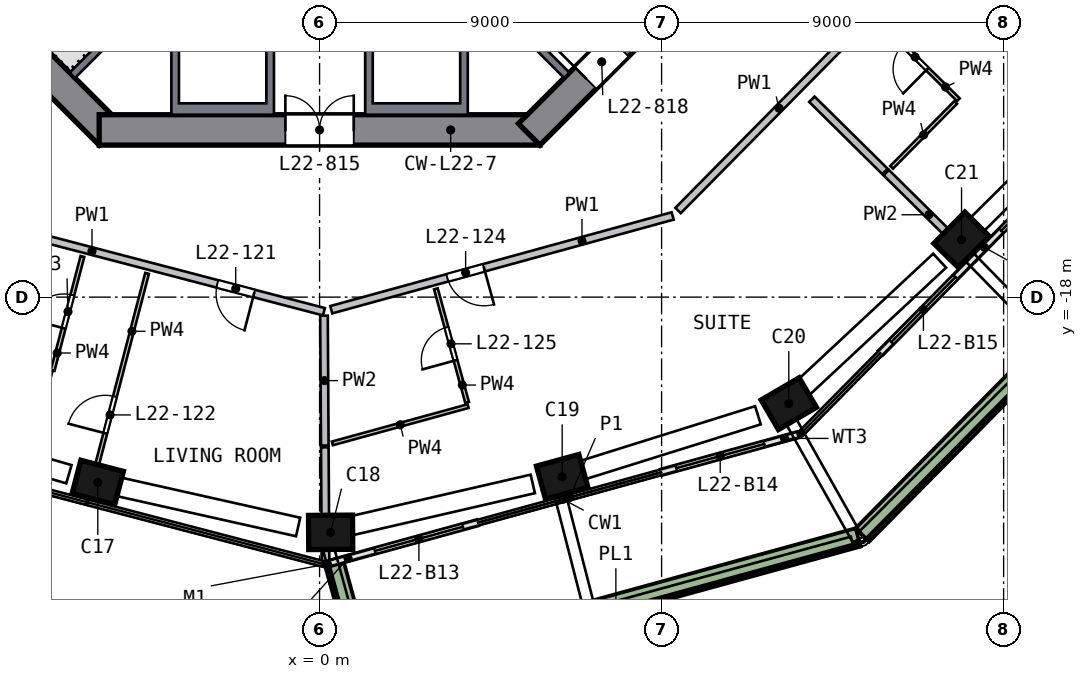
"""IFC4 building model, lengths in metres.
Left out: names, types, materials, properties, quantities, classifications, styles, units other than length and angle.
Written with IfcOpenShell. Run it as: python <this file> out.ifc"""

import sys

from ifc_helpers import new_model, si_unit, direction, frame, frame_2d, origin, origin_2d, place, context, subcontext, project, spatial, polyline, rectangle, outline, extrude, element, fill, save


model = new_model("IFC4")
c1 = context("Model", 3, precision=1e-05, world=origin(), true_north=direction((0.0, 1.0)))
c2 = subcontext(c1, "Body", "Model", "MODEL_VIEW")
j1 = project(units=[si_unit("LENGTHUNIT", "METRE"), si_unit("PLANEANGLEUNIT", "RADIAN")], contexts=[c1])
p1 = place(None, origin())
s1 = spatial("IfcSite", under=j1, at=p1, CompositionType="ELEMENT")
p2 = place(p1, origin())
s2 = spatial("IfcBuilding", under=s1, at=p2, CompositionType="ELEMENT")
p3 = place(p2, frame((0.0, 0.0, 96.5)))
s3 = spatial("IfcBuildingStorey", under=s2, at=p3, CompositionType="ELEMENT", Elevation=96.5)
p4 = place(p3, frame((-5.967, -22.842, 0.0), z_axis=(0.108904014, -0.027454154, 0.993673078), x_axis=(0.961432329, -0.251067637, -0.112307249)))
e1 = element("IfcColumn", 1, at=p4, inside=s3, PredefinedType="COLUMN", context=c2, shape_type="SweptSolid", body=[
    extrude(rectangle(XDim=1.15, YDim=0.9, at=origin_2d()), origin(), (0.0, 0.0, 1.0), 3.21),
])
p5 = place(p3, frame((0.152, -24.192, 0.0), z_axis=(0.115027932, 0.001672581, 0.993360849), x_axis=(-0.993343145, -0.00600963, 0.115036001)))
e2 = element("IfcColumn", 2, at=p5, inside=s3, PredefinedType="COLUMN", context=c2, shape_type="SweptSolid", body=[
    extrude(rectangle(XDim=1.15, YDim=0.9, at=origin_2d()), origin(), (0.0, 0.0, 1.0), 3.211),
])
p6 = place(p3, frame((6.253, -22.765, 0.0), z_axis=(0.108066988, 0.030724182, 0.993668733), x_axis=(0.958062623, 0.263618015, -0.112345681)))
e3 = element("IfcColumn", 3, at=p6, inside=s3, PredefinedType="COLUMN", context=c2, shape_type="SweptSolid", body=[
    extrude(rectangle(XDim=1.15, YDim=0.9, at=origin_2d()), origin(), (0.0, 0.0, 1.0), 3.21),
])
p7 = place(p3, frame((12.228, -20.875, 0.0), z_axis=(0.098758749, 0.058920732, 0.99336552), x_axis=(-0.857366586, -0.501695659, 0.114995663)))
e4 = element("IfcColumn", 4, at=p7, inside=s3, PredefinedType="COLUMN", context=c2, shape_type="SweptSolid", body=[
    extrude(rectangle(XDim=1.15, YDim=0.9, at=origin_2d()), origin(), (0.0, 0.0, 1.0), 3.211),
])
p8 = place(p3, frame((16.798, -16.588, 0.0), z_axis=(0.078255888, 0.080537401, 0.993674868), x_axis=(0.698489901, 0.706754906, -0.112291409)))
e5 = element("IfcColumn", 5, at=p8, inside=s3, PredefinedType="COLUMN", context=c2, shape_type="SweptSolid", body=[
    extrude(rectangle(XDim=1.15, YDim=0.9, at=origin_2d()), origin(), (0.0, 0.0, 1.0), 3.21),
])
p9 = place(p3, frame((-13.717, -5.516, 0.0), z_axis=(0.0, 0.0, 1.0), x_axis=(0.707106781, -0.707106781, 0.0)))
e6 = element("IfcWall", 6, at=p9, inside=s3, PredefinedType="SHEAR", context=c2, shape_type="SweptSolid", body=[
    extrude(rectangle(XDim=11.598, YDim=0.8, at=frame_2d((5.799, 0.0))), origin(), (0.0, 0.0, 1.0), 3.5),
])
p10 = place(p9, frame((2.099, 0.0, 0.0)))
e7 = element("IfcOpeningElement", 7, at=p10, cuts=e6, PredefinedType="OPENING", context=c2, shape_type="SweptSolid", body=[
    extrude(rectangle(XDim=1.2, YDim=2.1, at=frame_2d((0.6, 1.05))), frame((0.0, 0.41, 0.0), z_axis=(0.0, -1.0, 0.0), x_axis=(1.0, 0.0, 0.0)), (0.0, 0.0, 1.0), 0.82),
])
p11 = place(p3, frame((-5.799, -13.6, 0.0), z_axis=(0.0, 0.0, 1.0), x_axis=(1.0, 0.0, 0.0)))
e8 = element("IfcWall", 8, at=p11, inside=s3, PredefinedType="SHEAR", context=c2, shape_type="SweptSolid", body=[
    extrude(rectangle(XDim=11.598, YDim=0.8, at=frame_2d((5.799, 0.0))), origin(), (0.0, 0.0, 1.0), 3.5),
])
p12 = place(p11, frame((4.899, 0.0, 0.0)))
e9 = element("IfcOpeningElement", 9, at=p12, cuts=e8, PredefinedType="OPENING", context=c2, shape_type="SweptSolid", body=[
    extrude(rectangle(XDim=1.8, YDim=2.1, at=frame_2d((0.9, 1.05))), frame((0.0, 0.41, 0.0), z_axis=(0.0, -1.0, 0.0), x_axis=(1.0, 0.0, 0.0)), (0.0, 0.0, 1.0), 0.82),
])
p13 = place(p3, frame((5.516, -13.717, 0.0), z_axis=(0.0, 0.0, 1.0), x_axis=(0.707106781, 0.707106781, 0.0)))
e10 = element("IfcWall", 10, at=p13, inside=s3, PredefinedType="SHEAR", context=c2, shape_type="SweptSolid", body=[
    extrude(rectangle(XDim=11.598, YDim=0.8, at=frame_2d((5.799, 0.0))), origin(), (0.0, 0.0, 1.0), 3.5),
])
p14 = place(p13, frame((2.099, 0.0, 0.0)))
e11 = element("IfcOpeningElement", 11, at=p14, cuts=e10, PredefinedType="OPENING", context=c2, shape_type="SweptSolid", body=[
    extrude(rectangle(XDim=1.2, YDim=2.1, at=frame_2d((0.6, 1.05))), frame((0.0, 0.41, 0.0), z_axis=(0.0, -1.0, 0.0), x_axis=(1.0, 0.0, 0.0)), (0.0, 0.0, 1.0), 0.82),
])
p15 = place(p3, frame((0.235, -25.015, 0.0), z_axis=(0.0, 0.0, 1.0), x_axis=(0.964284377, 0.2648691, 0.0)))
e12 = element("IfcWall", 12, at=p15, inside=s3, PredefinedType="SOLIDWALL", context=c2, shape_type="SweptSolid", body=[
    extrude(rectangle(XDim=4.068, YDim=0.15, at=frame_2d((2.034, 0.0))), origin(), (0.0, 0.0, 1.0), 2.425),
])
p16 = place(p15, frame((1.268, 0.0, 0.0)))
e13 = element("IfcOpeningElement", 13, at=p16, cuts=e12, PredefinedType="OPENING", context=c2, shape_type="SweptSolid", body=[
    extrude(rectangle(XDim=2.4, YDim=2.4, at=frame_2d((1.2, 1.2))), frame((0.0, 0.085, 0.0), z_axis=(0.0, -1.0, 0.0), x_axis=(1.0, 0.0, 0.0)), (0.0, 0.0, 1.0), 0.17),
])
p17 = place(p3, frame((8.999, -22.607, 0.0), z_axis=(0.0, 0.0, 1.0), x_axis=(0.964270134, 0.264920947, 0.0)))
e14 = element("IfcWall", 14, at=p17, inside=s3, PredefinedType="SOLIDWALL", context=c2, shape_type="SweptSolid", body=[
    extrude(rectangle(XDim=3.71, YDim=0.15, at=frame_2d((1.855, 0.0))), origin(), (0.0, 0.0, 1.0), 2.425),
])
p18 = place(p17, frame((0.4, 0.0, 0.0)))
e15 = element("IfcOpeningElement", 15, at=p18, cuts=e14, PredefinedType="OPENING", context=c2, shape_type="SweptSolid", body=[
    extrude(rectangle(XDim=2.4, YDim=2.4, at=frame_2d((1.2, 1.2))), frame((0.0, 0.085, 0.0), z_axis=(0.0, -1.0, 0.0), x_axis=(1.0, 0.0, 0.0)), (0.0, 0.0, 1.0), 0.17),
])
p19 = place(p3, frame((14.766, -19.465, 0.0), z_axis=(0.0, 0.0, 1.0), x_axis=(0.702631444, 0.711553971, 0.0)))
e16 = element("IfcWall", 16, at=p19, inside=s3, PredefinedType="SOLIDWALL", context=c2, shape_type="SweptSolid", body=[
    extrude(rectangle(XDim=3.475, YDim=0.15, at=frame_2d((1.738, 0.0))), origin(), (0.0, 0.0, 1.0), 2.425),
])
p20 = place(p19, frame((0.4, 0.0, 0.0)))
e17 = element("IfcOpeningElement", 17, at=p20, cuts=e16, PredefinedType="OPENING", context=c2, shape_type="SweptSolid", body=[
    extrude(rectangle(XDim=2.4, YDim=2.4, at=frame_2d((1.2, 1.2))), frame((0.0, 0.085, 0.0), z_axis=(0.0, -1.0, 0.0), x_axis=(1.0, 0.0, 0.0)), (0.0, 0.0, 1.0), 0.17),
])
p21 = place(p3, frame((17.207, -16.992, 0.0), z_axis=(0.0, 0.0, 1.0), x_axis=(0.702669036, 0.711516848, 0.0)))
e18 = element("IfcWall", 18, at=p21, inside=s3, PredefinedType="SOLIDWALL", context=c2, shape_type="SweptSolid", body=[
    extrude(rectangle(XDim=3.835, YDim=0.15, at=frame_2d((1.918, 0.0))), origin(), (0.0, 0.0, 1.0), 2.425),
])
p22 = place(p21, frame((1.035, 0.0, 0.0)))
e19 = element("IfcOpeningElement", 19, at=p22, cuts=e18, PredefinedType="OPENING", context=c2, shape_type="SweptSolid", body=[
    extrude(rectangle(XDim=2.4, YDim=2.4, at=frame_2d((1.2, 1.2))), frame((0.0, 0.085, 0.0), z_axis=(0.0, -1.0, 0.0), x_axis=(1.0, 0.0, 0.0)), (0.0, 0.0, 1.0), 0.17),
])
p23 = place(p3, frame((0.399, -25.048, 0.0), z_axis=(0.0, 0.0, 1.0), x_axis=(0.264899272, -0.964276089, 0.0)))
e20 = element("IfcWall", 20, at=p23, inside=s3, PredefinedType="SOLIDWALL", context=c2, shape_type="SweptSolid", body=[
    extrude(rectangle(XDim=3.199, YDim=0.5, at=frame_2d((1.6, 0.0))), origin(), (0.0, 0.0, 1.0), 0.7),
])
p24 = place(p3, frame((1.421, -27.826, 0.0), z_axis=(0.0, 0.0, 1.0), x_axis=(0.964279464, 0.264886985, 0.0)))
e21 = element("IfcWall", 21, at=p24, inside=s3, PredefinedType="SOLIDWALL", context=c2, shape_type="SweptSolid", body=[
    extrude(rectangle(XDim=13.223, YDim=0.5, at=frame_2d((6.612, 0.0))), origin(), (0.0, 0.0, 1.0), 0.7),
])
p25 = place(p3, frame((14.284, -24.258, 0.0), z_axis=(0.0, 0.0, 1.0), x_axis=(0.702654229, 0.711531471, 0.0)))
e22 = element("IfcWall", 22, at=p25, inside=s3, PredefinedType="SOLIDWALL", context=c2, shape_type="SweptSolid", body=[
    extrude(rectangle(XDim=13.723, YDim=0.5, at=frame_2d((6.862, 0.0))), origin(), (0.0, 0.0, 1.0), 0.7),
])
p26 = place(p3, origin())
e23 = element("IfcWall", 23, at=p26, inside=s3, PredefinedType="SOLIDWALL", context=c2, shape_type="SweptSolid", body=[
    extrude(outline(polyline([(-1.2, -13.2), (-3.9, -13.2), (-3.9, -10.7), (-1.2, -10.7), (-1.2, -13.2)]), holes=[polyline([(-3.7, -10.9), (-3.7, -12.9), (-1.4, -12.9), (-1.4, -10.9), (-3.7, -10.9)])]), origin(), (0.0, 0.0, 1.0), 3.19),
])
p27 = place(p3, origin())
e24 = element("IfcWall", 24, at=p27, inside=s3, PredefinedType="SOLIDWALL", context=c2, shape_type="SweptSolid", body=[
    extrude(outline(polyline([(3.9, -10.7), (3.9, -13.2), (1.2, -13.2), (1.2, -10.7), (3.9, -10.7)]), holes=[polyline([(1.4, -12.9), (3.7, -12.9), (3.7, -10.9), (1.4, -10.9), (1.4, -12.9)])]), origin(), (0.0, 0.0, 1.0), 3.19),
])
for number, where, z_axis, x_axis in (
    (25, (-3.677, -9.334, 0.0), (0.0, 0.0, 1.0), (-0.707, -0.707, 0.0)),
    (26, (3.677, -9.334, 0.0), (0.0, 0.0, 1.0), (0.707, -0.707, 0.0)),
):
    element("IfcWall", number, at=place(p3, frame(where, z_axis=z_axis, x_axis=x_axis)), inside=s3, PredefinedType="SOLIDWALL", context=c2, shape_type="SweptSolid", body=[
        extrude(rectangle(XDim=4.0, YDim=0.2, at=frame_2d((2.0, 0.0))), origin(), (0.0, 0.0, 1.0), 3.19),
    ])
p28 = place(p3, frame((0.115, -18.385, 0.0), z_axis=(0.0, 0.0, 1.0), x_axis=(-0.967527583, 0.252765459, 0.0)))
e27 = element("IfcWall", 27, at=p28, inside=s3, PredefinedType="SOLIDWALL", context=c2, shape_type="SweptSolid", body=[
    extrude(rectangle(XDim=9.517, YDim=0.2, at=frame_2d((4.758, 0.0))), origin(), (0.0, 0.0, 1.0), 3.19),
])
p29 = place(p28, frame((1.9, 0.0, 0.0)))
e28 = element("IfcOpeningElement", 28, at=p29, cuts=e27, PredefinedType="OPENING", context=c2, shape_type="SweptSolid", body=[
    extrude(rectangle(XDim=1.0, YDim=2.1, at=frame_2d((0.5, 1.05))), frame((0.0, 0.11, 0.0), z_axis=(0.0, -1.0, 0.0), x_axis=(1.0, 0.0, 0.0)), (0.0, 0.0, 1.0), 0.22),
])
p30 = place(p3, frame((9.292, -15.864, 0.0), z_axis=(0.0, 0.0, 1.0), x_axis=(-0.96428508, -0.264866543, 0.0)))
e29 = element("IfcWall", 29, at=p30, inside=s3, PredefinedType="SOLIDWALL", context=c2, shape_type="SweptSolid", body=[
    extrude(rectangle(XDim=9.316, YDim=0.2, at=frame_2d((4.658, 0.0))), origin(), (0.0, 0.0, 1.0), 3.19),
])
p31 = place(p30, frame((5.15, 0.0, 0.0)))
e30 = element("IfcOpeningElement", 30, at=p31, cuts=e29, PredefinedType="OPENING", context=c2, shape_type="SweptSolid", body=[
    extrude(rectangle(XDim=1.0, YDim=2.1, at=frame_2d((0.5, 1.05))), frame((0.0, 0.11, 0.0), z_axis=(0.0, -1.0, 0.0), x_axis=(1.0, 0.0, 0.0)), (0.0, 0.0, 1.0), 0.22),
])
p32 = place(p3, frame((15.839, -9.235, 0.0), z_axis=(0.0, 0.0, 1.0), x_axis=(-0.702660587, -0.711525192, 0.0)))
e31 = element("IfcWall", 31, at=p32, inside=s3, PredefinedType="SOLIDWALL", context=c2, shape_type="SweptSolid", body=[
    extrude(rectangle(XDim=9.116, YDim=0.2, at=frame_2d((4.558, 0.0))), origin(), (0.0, 0.0, 1.0), 3.19),
])
p33 = place(p32, frame((0.35, 0.0, 0.0)))
e32 = element("IfcOpeningElement", 32, at=p33, cuts=e31, PredefinedType="OPENING", context=c2, shape_type="SweptSolid", body=[
    extrude(rectangle(XDim=1.0, YDim=2.1, at=frame_2d((0.5, 1.05))), frame((0.0, 0.11, 0.0), z_axis=(0.0, -1.0, 0.0), x_axis=(1.0, 0.0, 0.0)), (0.0, 0.0, 1.0), 0.22),
])
p34 = place(p3, frame((0.116, -18.488, 0.0), z_axis=(0.0, 0.0, 1.0), x_axis=(0.006284692, -0.999980251, 0.0)))
e33 = element("IfcWall", 33, at=p34, inside=s3, PredefinedType="SOLIDWALL", context=c2, shape_type="SweptSolid", body=[
    extrude(rectangle(XDim=3.418, YDim=0.2, at=frame_2d((1.709, 0.0))), origin(), (0.0, 0.0, 1.0), 3.19),
])
p35 = place(p3, frame((0.138, -21.952, 0.0), z_axis=(0.0, 0.0, 1.0), x_axis=(0.006323343, -0.999980007, 0.0)))
e34 = element("IfcWall", 34, at=p35, inside=s3, PredefinedType="SOLIDWALL", context=c2, shape_type="SweptSolid", body=[
    extrude(rectangle(XDim=3.011, YDim=0.2, at=frame_2d((1.506, 0.0))), origin(), (0.0, 0.0, 1.0), 3.19),
])
p36 = place(p3, frame((12.954, -12.792, 0.0), z_axis=(0.0, 0.0, 1.0), x_axis=(0.711560793, -0.702624535, 0.0)))
e35 = element("IfcWall", 35, at=p36, inside=s3, PredefinedType="SOLIDWALL", context=c2, shape_type="SweptSolid", body=[
    extrude(rectangle(XDim=2.705, YDim=0.2, at=frame_2d((1.352, 0.0))), origin(), (0.0, 0.0, 1.0), 3.19),
])
p37 = place(p3, frame((14.911, -14.725, 0.0), z_axis=(0.0, 0.0, 1.0), x_axis=(0.711546698, -0.702638809, 0.0)))
e36 = element("IfcWall", 36, at=p37, inside=s3, PredefinedType="SOLIDWALL", context=c2, shape_type="SweptSolid", body=[
    extrude(rectangle(XDim=3.152, YDim=0.2, at=frame_2d((1.576, 0.0))), origin(), (0.0, 0.0, 1.0), 3.19),
])
p38 = place(p3, frame((16.453, -9.362, 0.0), z_axis=(0.0, 0.0, 1.0), x_axis=(0.869145541, -0.494556396, 0.0)))
e37 = element("IfcWall", 37, at=p38, inside=s3, PredefinedType="SOLIDWALL", context=c2, shape_type="SweptSolid", body=[
    extrude(rectangle(XDim=6.034, YDim=0.2, at=frame_2d((3.017, 0.0))), origin(), (0.0, 0.0, 1.0), 3.19),
])
p39 = place(p3, frame((-10.633, -19.091, 0.0), z_axis=(0.0, 0.0, 1.0), x_axis=(0.967525515, -0.252773373, 0.0)))
e38 = element("IfcWall", 38, at=p39, inside=s3, PredefinedType="PARTITIONING", context=c2, shape_type="SweptSolid", body=[
    extrude(rectangle(XDim=3.704, YDim=0.1, at=frame_2d((1.852, 0.0))), origin(), (0.0, 0.0, 1.0), 3.19),
])
p40 = place(p3, frame((-7.024, -19.93, 0.0), z_axis=(0.0, 0.0, 1.0), x_axis=(0.252806597, 0.967516834, 0.0)))
e39 = element("IfcWall", 39, at=p40, inside=s3, PredefinedType="PARTITIONING", context=c2, shape_type="SweptSolid", body=[
    extrude(rectangle(XDim=3.1, YDim=0.1, at=frame_2d((1.55, 0.0))), origin(), (0.0, 0.0, 1.0), 3.19),
])
p41 = place(p40, frame((1.15, 0.0, 0.0)))
e40 = element("IfcOpeningElement", 40, at=p41, cuts=e39, PredefinedType="OPENING", context=c2, shape_type="SweptSolid", body=[
    extrude(rectangle(XDim=0.9, YDim=2.1, at=frame_2d((0.45, 1.05))), frame((0.0, 0.06, 0.0), z_axis=(0.0, -1.0, 0.0), x_axis=(1.0, 0.0, 0.0)), (0.0, 0.0, 1.0), 0.12),
])
p42 = place(p3, frame((-6.093, -23.326, 0.0), z_axis=(0.0, 0.0, 1.0), x_axis=(0.252749926, 0.96753164, 0.0)))
e41 = element("IfcWall", 41, at=p42, inside=s3, PredefinedType="PARTITIONING", context=c2, shape_type="SweptSolid", body=[
    extrude(rectangle(XDim=6.15, YDim=0.1, at=frame_2d((3.075, 0.0))), origin(), (0.0, 0.0, 1.0), 3.19),
])
p43 = place(p42, frame((1.8, 0.0, 0.0)))
e42 = element("IfcOpeningElement", 42, at=p43, cuts=e41, PredefinedType="OPENING", context=c2, shape_type="SweptSolid", body=[
    extrude(rectangle(XDim=1.0, YDim=2.1, at=frame_2d((0.5, 1.05))), frame((0.0, 0.06, 0.0), z_axis=(0.0, -1.0, 0.0), x_axis=(1.0, 0.0, 0.0)), (0.0, 0.0, 1.0), 0.12),
])
p44 = place(p3, frame((3.909, -20.868, 0.0), z_axis=(0.0, 0.0, 1.0), x_axis=(-0.964289186, -0.264851593, 0.0)))
e43 = element("IfcWall", 43, at=p44, inside=s3, PredefinedType="PARTITIONING", context=c2, shape_type="SweptSolid", body=[
    extrude(rectangle(XDim=3.704, YDim=0.1, at=frame_2d((1.852, 0.0))), origin(), (0.0, 0.0, 1.0), 3.19),
])
p45 = place(p3, frame((3.883, -20.772, 0.0), z_axis=(0.0, 0.0, 1.0), x_axis=(-0.264929502, 0.964267784, 0.0)))
e44 = element("IfcWall", 44, at=p45, inside=s3, PredefinedType="PARTITIONING", context=c2, shape_type="SweptSolid", body=[
    extrude(rectangle(XDim=3.1, YDim=0.1, at=frame_2d((1.55, 0.0))), origin(), (0.0, 0.0, 1.0), 3.19),
])
p46 = place(p45, frame((1.15, 0.0, 0.0)))
e45 = element("IfcOpeningElement", 45, at=p46, cuts=e44, PredefinedType="OPENING", context=c2, shape_type="SweptSolid", body=[
    extrude(rectangle(XDim=0.9, YDim=2.1, at=frame_2d((0.45, 1.05))), frame((0.0, 0.06, 0.0), z_axis=(0.0, -1.0, 0.0), x_axis=(1.0, 0.0, 0.0)), (0.0, 0.0, 1.0), 0.12),
])
p47 = place(p3, frame((16.81, -12.805, 0.0), z_axis=(0.0, 0.0, 1.0), x_axis=(-0.711568401, 0.702616831, 0.0)))
e46 = element("IfcWall", 46, at=p47, inside=s3, PredefinedType="PARTITIONING", context=c2, shape_type="SweptSolid", body=[
    extrude(rectangle(XDim=3.0, YDim=0.1, at=frame_2d((1.5, 0.0))), origin(), (0.0, 0.0, 1.0), 3.19),
])
p48 = place(p47, frame((1.15, 0.0, 0.0)))
e47 = element("IfcOpeningElement", 47, at=p48, cuts=e46, PredefinedType="OPENING", context=c2, shape_type="SweptSolid", body=[
    extrude(rectangle(XDim=0.9, YDim=2.1, at=frame_2d((0.45, 1.05))), frame((0.0, 0.06, 0.0), z_axis=(0.0, -1.0, 0.0), x_axis=(1.0, 0.0, 0.0)), (0.0, 0.0, 1.0), 0.12),
])
p49 = place(p3, frame((16.74, -12.876, 0.0), z_axis=(0.0, 0.0, 1.0), x_axis=(-0.702719059, -0.711467444, 0.0)))
e48 = element("IfcWall", 48, at=p49, inside=s3, PredefinedType="PARTITIONING", context=c2, shape_type="SweptSolid", body=[
    extrude(rectangle(XDim=2.4, YDim=0.1, at=frame_2d((1.2, 0.0))), origin(), (0.0, 0.0, 1.0), 3.19),
])
p50 = place(p16, origin())
e49 = element("IfcDoor", 49, at=p50, inside=s3, OperationType="SLIDING_TO_LEFT", PredefinedType="DOOR", context=c2, shape_type="SweptSolid", body=[
    extrude(rectangle(XDim=2.4, YDim=2.4, at=frame_2d((1.2, 1.2))), frame((0.0, 0.025, 0.0), z_axis=(0.0, -1.0, 0.0), x_axis=(1.0, 0.0, 0.0)), (0.0, 0.0, 1.0), 0.05),
])
fill(e13, e49)
p51 = place(p18, origin())
e50 = element("IfcDoor", 50, at=p51, inside=s3, OperationType="SLIDING_TO_RIGHT", PredefinedType="DOOR", context=c2, shape_type="SweptSolid", body=[
    extrude(rectangle(XDim=2.4, YDim=2.4, at=frame_2d((1.2, 1.2))), frame((0.0, 0.025, 0.0), z_axis=(0.0, -1.0, 0.0), x_axis=(1.0, 0.0, 0.0)), (0.0, 0.0, 1.0), 0.05),
])
fill(e15, e50)
p52 = place(p20, origin())
e51 = element("IfcDoor", 51, at=p52, inside=s3, OperationType="SLIDING_TO_RIGHT", PredefinedType="DOOR", context=c2, shape_type="SweptSolid", body=[
    extrude(rectangle(XDim=2.4, YDim=2.4, at=frame_2d((1.2, 1.2))), frame((0.0, 0.025, 0.0), z_axis=(0.0, -1.0, 0.0), x_axis=(1.0, 0.0, 0.0)), (0.0, 0.0, 1.0), 0.05),
])
fill(e17, e51)
p53 = place(p22, origin())
e52 = element("IfcDoor", 52, at=p53, inside=s3, OperationType="SLIDING_TO_LEFT", PredefinedType="DOOR", context=c2, shape_type="SweptSolid", body=[
    extrude(rectangle(XDim=2.4, YDim=2.4, at=frame_2d((1.2, 1.2))), frame((0.0, 0.025, 0.0), z_axis=(0.0, -1.0, 0.0), x_axis=(1.0, 0.0, 0.0)), (0.0, 0.0, 1.0), 0.05),
])
fill(e19, e52)
p54 = place(p12, origin())
e53 = element("IfcDoor", 53, at=p54, inside=s3, OperationType="DOUBLE_DOOR_SINGLE_SWING", PredefinedType="DOOR", context=c2, shape_type="SweptSolid", body=[
    extrude(rectangle(XDim=1.8, YDim=2.1, at=frame_2d((0.9, 1.05))), frame((0.0, 0.025, 0.0), z_axis=(0.0, -1.0, 0.0), x_axis=(1.0, 0.0, 0.0)), (0.0, 0.0, 1.0), 0.05),
])
fill(e9, e53)
p55 = place(p14, origin())
e54 = element("IfcDoor", 54, at=p55, inside=s3, OperationType="SINGLE_SWING_LEFT", PredefinedType="DOOR", context=c2, shape_type="SweptSolid", body=[
    extrude(rectangle(XDim=1.2, YDim=2.1, at=frame_2d((0.6, 1.05))), frame((0.0, 0.025, 0.0), z_axis=(0.0, -1.0, 0.0), x_axis=(1.0, 0.0, 0.0)), (0.0, 0.0, 1.0), 0.05),
])
fill(e11, e54)
p56 = place(p29, origin())
e55 = element("IfcDoor", 55, at=p56, inside=s3, OperationType="SINGLE_SWING_LEFT", PredefinedType="DOOR", context=c2, shape_type="SweptSolid", body=[
    extrude(rectangle(XDim=1.0, YDim=2.1, at=frame_2d((0.5, 1.05))), frame((0.0, 0.025, 0.0), z_axis=(0.0, -1.0, 0.0), x_axis=(1.0, 0.0, 0.0)), (0.0, 0.0, 1.0), 0.05),
])
fill(e28, e55)
p57 = place(p43, origin())
e56 = element("IfcDoor", 56, at=p57, inside=s3, OperationType="SINGLE_SWING_LEFT", PredefinedType="DOOR", context=c2, shape_type="SweptSolid", body=[
    extrude(rectangle(XDim=1.0, YDim=2.1, at=frame_2d((0.5, 1.05))), frame((0.0, 0.025, 0.0), z_axis=(0.0, -1.0, 0.0), x_axis=(1.0, 0.0, 0.0)), (0.0, 0.0, 1.0), 0.05),
])
fill(e42, e56)
p58 = place(p41, origin())
e57 = element("IfcDoor", 57, at=p58, inside=s3, OperationType="SINGLE_SWING_LEFT", PredefinedType="DOOR", context=c2, shape_type="SweptSolid", body=[
    extrude(rectangle(XDim=0.9, YDim=2.1, at=frame_2d((0.45, 1.05))), frame((0.0, 0.025, 0.0), z_axis=(0.0, -1.0, 0.0), x_axis=(1.0, 0.0, 0.0)), (0.0, 0.0, 1.0), 0.05),
])
fill(e40, e57)
p59 = place(p31, origin())
e58 = element("IfcDoor", 58, at=p59, inside=s3, OperationType="SINGLE_SWING_LEFT", PredefinedType="DOOR", context=c2, shape_type="SweptSolid", body=[
    extrude(rectangle(XDim=1.0, YDim=2.1, at=frame_2d((0.5, 1.05))), frame((0.0, 0.025, 0.0), z_axis=(0.0, -1.0, 0.0), x_axis=(1.0, 0.0, 0.0)), (0.0, 0.0, 1.0), 0.05),
])
fill(e30, e58)
p60 = place(p46, origin())
e59 = element("IfcDoor", 59, at=p60, inside=s3, OperationType="SINGLE_SWING_LEFT", PredefinedType="DOOR", context=c2, shape_type="SweptSolid", body=[
    extrude(rectangle(XDim=0.9, YDim=2.1, at=frame_2d((0.45, 1.05))), frame((0.0, 0.025, 0.0), z_axis=(0.0, -1.0, 0.0), x_axis=(1.0, 0.0, 0.0)), (0.0, 0.0, 1.0), 0.05),
])
fill(e45, e59)
p61 = place(p48, origin())
e60 = element("IfcDoor", 60, at=p61, inside=s3, OperationType="SINGLE_SWING_LEFT", PredefinedType="DOOR", context=c2, shape_type="SweptSolid", body=[
    extrude(rectangle(XDim=0.9, YDim=2.1, at=frame_2d((0.45, 1.05))), frame((0.0, 0.025, 0.0), z_axis=(0.0, -1.0, 0.0), x_axis=(1.0, 0.0, 0.0)), (0.0, 0.0, 1.0), 0.05),
])
fill(e47, e60)
save(model, sys.argv[1])
